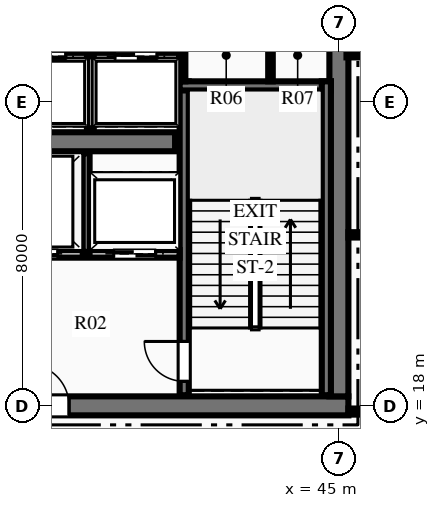
"""IFC4 building model, lengths in metres.
Left out: names, types, materials, properties, quantities, classifications, styles, units other than length and angle.
Written with IfcOpenShell. Run it as: python <this file> out.ifc"""

import sys

from ifc_helpers import new_model, si_unit, direction, frame, frame_2d, origin, place, context, subcontext, project, spatial, rectangle, extrude, element, fill, save


model = new_model("IFC4")
c1 = context("Model", 3, precision=1e-05, world=origin(), true_north=direction((0.0, 1.0)))
c2 = subcontext(c1, "Body", "Model", "MODEL_VIEW")
j1 = project(units=[si_unit("LENGTHUNIT", "METRE"), si_unit("PLANEANGLEUNIT", "RADIAN")], contexts=[c1])
p1 = place(None, origin())
s1 = spatial("IfcSite", under=j1, at=p1, CompositionType="ELEMENT")
p2 = place(p1, origin())
s2 = spatial("IfcBuilding", under=s1, at=p2, CompositionType="ELEMENT")
p3 = place(p2, frame((0.0, 0.0, 136.2)))
s3 = spatial("IfcBuildingStorey", under=s2, at=p3, CompositionType="ELEMENT", Elevation=136.2)
p4 = place(p3, frame((26.75, 18.0, 0.0), z_axis=(0.0, 0.0, 1.0), x_axis=(1.0, 0.0, 0.0)))
e1 = element("IfcWall", 1, at=p4, inside=s3, PredefinedType="SHEAR", context=c2, shape_type="SweptSolid", body=[
    extrude(rectangle(XDim=18.5, YDim=0.5, at=frame_2d((9.25, 0.0))), origin(), (0.0, 0.0, 1.0), 4.5),
])
p5 = place(p4, frame((7.35, 0.0, 0.0)))
e2 = element("IfcOpeningElement", 2, at=p5, cuts=e1, PredefinedType="OPENING", context=c2, shape_type="SweptSolid", body=[
    extrude(rectangle(XDim=1.1, YDim=2.15, at=frame_2d((0.55, 1.075))), frame((0.0, 0.26, 0.0), z_axis=(0.0, -1.0, 0.0), x_axis=(1.0, 0.0, 0.0)), (0.0, 0.0, 1.0), 0.52),
])
p6 = place(p4, frame((10.05, 0.0, 0.0)))
e3 = element("IfcOpeningElement", 3, at=p6, cuts=e1, PredefinedType="OPENING", context=c2, shape_type="SweptSolid", body=[
    extrude(rectangle(XDim=1.1, YDim=2.15, at=frame_2d((0.55, 1.075))), frame((0.0, 0.26, 0.0), z_axis=(0.0, -1.0, 0.0), x_axis=(1.0, 0.0, 0.0)), (0.0, 0.0, 1.0), 0.52),
])
p7 = place(p3, frame((45.0, 18.25, 0.0), z_axis=(0.0, 0.0, 1.0), x_axis=(0.0, 1.0, 0.0)))
e4 = element("IfcWall", 4, at=p7, inside=s3, PredefinedType="SHEAR", context=c2, shape_type="SweptSolid", body=[
    extrude(rectangle(XDim=15.5, YDim=0.5, at=frame_2d((7.75, 0.0))), origin(), (0.0, 0.0, 1.0), 4.5),
])
p8 = place(p7, frame((9.99, 0.0, 0.0)))
e5 = element("IfcOpeningElement", 5, at=p8, cuts=e4, PredefinedType="OPENING", context=c2, shape_type="SweptSolid", body=[
    extrude(rectangle(XDim=1.4, YDim=2.2, at=frame_2d((0.7, 1.1))), frame((0.0, 0.26, 0.0), z_axis=(0.0, -1.0, 0.0), x_axis=(1.0, 0.0, 0.0)), (0.0, 0.0, 1.0), 0.52),
])
p9 = place(p3, frame((31.31, 24.95, 0.0), z_axis=(0.0, 0.0, 1.0), x_axis=(1.0, 0.0, 0.0)))
e6 = element("IfcWall", 6, at=p9, inside=s3, PredefinedType="SHEAR", context=c2, shape_type="SweptSolid", body=[
    extrude(rectangle(XDim=9.38, YDim=0.5, at=frame_2d((4.69, 0.0))), origin(), (0.0, 0.0, 1.0), 4.5),
])
p10 = place(p3, frame((40.93, 18.28, 0.0), z_axis=(0.0, 0.0, 1.0), x_axis=(0.0, 1.0, 0.0)))
e7 = element("IfcWall", 7, at=p10, inside=s3, PredefinedType="SHEAR", context=c2, shape_type="SweptSolid", body=[
    extrude(rectangle(XDim=8.26, YDim=0.24, at=frame_2d((4.13, 0.0))), origin(), (0.0, 0.0, 1.0), 4.5),
])
p11 = place(p10, frame((0.365, 0.0, 0.0)))
e8 = element("IfcOpeningElement", 8, at=p11, cuts=e7, PredefinedType="OPENING", context=c2, shape_type="SweptSolid", body=[
    extrude(rectangle(XDim=1.05, YDim=2.15, at=frame_2d((0.525, 1.075))), frame((0.0, 0.13, 0.0), z_axis=(0.0, -1.0, 0.0), x_axis=(1.0, 0.0, 0.0)), (0.0, 0.0, 1.0), 0.26),
])
p12 = place(p3, frame((40.81, 26.42, 0.0), z_axis=(0.0, 0.0, 1.0), x_axis=(1.0, 0.0, 0.0)))
e9 = element("IfcWall", 9, at=p12, inside=s3, PredefinedType="SHEAR", context=c2, shape_type="SweptSolid", body=[
    extrude(rectangle(XDim=3.98, YDim=0.24, at=frame_2d((1.99, 0.0))), origin(), (0.0, 0.0, 1.0), 4.5),
])
p13 = place(p3, frame((44.67, 18.28, 0.0), z_axis=(0.0, 0.0, 1.0), x_axis=(0.0, 1.0, 0.0)))
e10 = element("IfcWall", 10, at=p13, inside=s3, PredefinedType="SHEAR", context=c2, shape_type="SweptSolid", body=[
    extrude(rectangle(XDim=8.26, YDim=0.24, at=frame_2d((4.13, 0.0))), origin(), (0.0, 0.0, 1.0), 4.5),
])
p14 = place(p3, frame((36.12, 22.0, 0.0), z_axis=(0.0, 0.0, 1.0), x_axis=(1.0, 0.0, 0.0)))
e11 = element("IfcWall", 11, at=p14, inside=s3, PredefinedType="PARTITIONING", context=c2, shape_type="SweptSolid", body=[
    extrude(rectangle(XDim=4.69, YDim=0.2, at=frame_2d((2.345, 0.0))), origin(), (0.0, 0.0, 1.0), 4.21),
])
p15 = place(p14, frame((2.955, 0.0, 0.0)))
e12 = element("IfcOpeningElement", 12, at=p15, cuts=e11, PredefinedType="OPENING", context=c2, shape_type="SweptSolid", body=[
    extrude(rectangle(XDim=1.1, YDim=2.15, at=frame_2d((0.55, 1.075))), frame((0.0, 0.11, 0.0), z_axis=(0.0, -1.0, 0.0), x_axis=(1.0, 0.0, 0.0)), (0.0, 0.0, 1.0), 0.22),
])
p16 = place(p14, frame((0.08, 0.0, 0.0)))
e13 = element("IfcOpeningElement", 13, at=p16, cuts=e11, PredefinedType="OPENING", context=c2, shape_type="SweptSolid", body=[
    extrude(rectangle(XDim=1.4, YDim=2.2, at=frame_2d((0.7, 1.1))), frame((0.0, 0.11, 0.0), z_axis=(0.0, -1.0, 0.0), x_axis=(1.0, 0.0, 0.0)), (0.0, 0.0, 1.0), 0.22),
])
p17 = place(p3, frame((38.35, 22.05, 0.0), z_axis=(0.0, 0.0, 1.0), x_axis=(0.0, 1.0, 0.0)))
e14 = element("IfcWall", 14, at=p17, inside=s3, PredefinedType="PARTITIONING", context=c2, shape_type="SweptSolid", body=[
    extrude(rectangle(XDim=2.6, YDim=0.18, at=frame_2d((1.3, 0.0))), origin(), (0.0, 0.0, 1.0), 4.21),
])
p18 = place(p3, frame((40.88, 26.54, 0.0), z_axis=(0.0, 0.0, 1.0), x_axis=(0.0, 1.0, 0.0)))
e15 = element("IfcWall", 15, at=p18, inside=s3, PredefinedType="PARTITIONING", context=c2, shape_type="SweptSolid", body=[
    extrude(rectangle(XDim=1.51, YDim=0.16, at=frame_2d((0.755, 0.0))), origin(), (0.0, 0.0, 1.0), 4.21),
])
p19 = place(p3, frame((43.2, 26.54, 0.0), z_axis=(0.0, 0.0, 1.0), x_axis=(0.0, 1.0, 0.0)))
e16 = element("IfcWall", 16, at=p19, inside=s3, PredefinedType="PARTITIONING", context=c2, shape_type="SweptSolid", body=[
    extrude(rectangle(XDim=1.44, YDim=0.12, at=frame_2d((0.72, 0.0))), origin(), (0.0, 0.0, 1.0), 4.21),
])
p20 = place(p3, frame((31.2, 27.2, 0.0), z_axis=(0.0, 0.0, 1.0), x_axis=(1.0, 0.0, 0.0)))
e17 = element("IfcWall", 17, at=p20, inside=s3, PredefinedType="PARTITIONING", context=c2, shape_type="SweptSolid", body=[
    extrude(rectangle(XDim=9.6, YDim=0.18, at=frame_2d((4.8, 0.0))), origin(), (0.0, 0.0, 1.0), 4.21),
])
p21 = place(p20, frame((0.59, 0.0, 0.0)))
e18 = element("IfcOpeningElement", 18, at=p21, cuts=e17, PredefinedType="OPENING", context=c2, shape_type="SweptSolid", body=[
    extrude(rectangle(XDim=1.1, YDim=2.15, at=frame_2d((0.55, 1.075))), frame((0.0, 0.1, 0.0), z_axis=(0.0, -1.0, 0.0), x_axis=(1.0, 0.0, 0.0)), (0.0, 0.0, 1.0), 0.2),
])
p22 = place(p20, frame((2.99, 0.0, 0.0)))
e19 = element("IfcOpeningElement", 19, at=p22, cuts=e17, PredefinedType="OPENING", context=c2, shape_type="SweptSolid", body=[
    extrude(rectangle(XDim=1.1, YDim=2.15, at=frame_2d((0.55, 1.075))), frame((0.0, 0.1, 0.0), z_axis=(0.0, -1.0, 0.0), x_axis=(1.0, 0.0, 0.0)), (0.0, 0.0, 1.0), 0.2),
])
p23 = place(p20, frame((5.51, 0.0, 0.0)))
e20 = element("IfcOpeningElement", 20, at=p23, cuts=e17, PredefinedType="OPENING", context=c2, shape_type="SweptSolid", body=[
    extrude(rectangle(XDim=1.1, YDim=2.15, at=frame_2d((0.55, 1.075))), frame((0.0, 0.1, 0.0), z_axis=(0.0, -1.0, 0.0), x_axis=(1.0, 0.0, 0.0)), (0.0, 0.0, 1.0), 0.2),
])
p24 = place(p20, frame((7.91, 0.0, 0.0)))
e21 = element("IfcOpeningElement", 21, at=p24, cuts=e17, PredefinedType="OPENING", context=c2, shape_type="SweptSolid", body=[
    extrude(rectangle(XDim=1.1, YDim=2.15, at=frame_2d((0.55, 1.075))), frame((0.0, 0.1, 0.0), z_axis=(0.0, -1.0, 0.0), x_axis=(1.0, 0.0, 0.0)), (0.0, 0.0, 1.0), 0.2),
])
p25 = place(p3, frame((38.46, 25.3, 0.0), z_axis=(0.0, 0.0, 1.0), x_axis=(0.0, 1.0, 0.0)))
e22 = element("IfcWall", 22, at=p25, inside=s3, PredefinedType="PARTITIONING", context=c2, shape_type="SweptSolid", body=[
    extrude(rectangle(XDim=1.9, YDim=0.18, at=frame_2d((0.95, 0.0))), origin(), (0.0, 0.0, 1.0), 4.21),
])
p26 = place(p3, frame((45.25, 17.85, 0.0), z_axis=(0.0, 0.0, 1.0), x_axis=(1.0, 0.0, 0.0)))
e23 = element("IfcWall", 23, at=p26, inside=s3, PredefinedType="PARTITIONING", context=c2, shape_type="SweptSolid", body=[
    extrude(rectangle(XDim=8.55, YDim=0.16, at=frame_2d((4.275, 0.0))), origin(), (0.0, 0.0, 1.0), 3.748),
])
p27 = place(p26, frame((2.211, 0.0, 0.0)))
e24 = element("IfcOpeningElement", 24, at=p27, cuts=e23, PredefinedType="OPENING", context=c2, shape_type="SweptSolid", body=[
    extrude(rectangle(XDim=1.05, YDim=2.15, at=frame_2d((0.525, 1.075))), frame((0.0, 0.09, 0.0), z_axis=(0.0, -1.0, 0.0), x_axis=(1.0, 0.0, 0.0)), (0.0, 0.0, 1.0), 0.18),
])
p28 = place(p3, frame((45.2, 27.25, 0.0), z_axis=(0.0, 0.0, 1.0), x_axis=(1.0, 0.0, 0.0)))
e25 = element("IfcWall", 25, at=p28, inside=s3, PredefinedType="PARTITIONING", context=c2, shape_type="SweptSolid", body=[
    extrude(rectangle(XDim=2.25, YDim=0.16, at=frame_2d((1.125, 0.0))), origin(), (0.0, 0.0, 1.0), 4.21),
])
p29 = place(p3, frame((45.25, 22.5, 0.0), z_axis=(0.0, 0.0, 1.0), x_axis=(1.0, 0.0, 0.0)))
e26 = element("IfcWall", 26, at=p29, inside=s3, PredefinedType="PARTITIONING", context=c2, shape_type="SweptSolid", body=[
    extrude(rectangle(XDim=22.649, YDim=0.14, at=frame_2d((11.325, 0.0))), origin(), (0.0, 0.0, 1.0), 4.21),
])
p30 = place(p11, origin())
e27 = element("IfcDoor", 27, at=p30, inside=s3, OperationType="SINGLE_SWING_RIGHT", PredefinedType="DOOR", context=c2, shape_type="SweptSolid", body=[
    extrude(rectangle(XDim=1.05, YDim=2.15, at=frame_2d((0.525, 1.075))), frame((0.0, 0.025, 0.0), z_axis=(0.0, -1.0, 0.0), x_axis=(1.0, 0.0, 0.0)), (0.0, 0.0, 1.0), 0.05),
])
fill(e8, e27)
p31 = place(p6, origin())
e28 = element("IfcDoor", 28, at=p31, inside=s3, OperationType="SINGLE_SWING_LEFT", PredefinedType="DOOR", context=c2, shape_type="SweptSolid", body=[
    extrude(rectangle(XDim=1.1, YDim=2.15, at=frame_2d((0.55, 1.075))), frame((0.0, 0.025, 0.0), z_axis=(0.0, -1.0, 0.0), x_axis=(1.0, 0.0, 0.0)), (0.0, 0.0, 1.0), 0.05),
])
fill(e3, e28)
p32 = place(p23, origin())
e29 = element("IfcDoor", 29, at=p32, inside=s3, OperationType="SLIDING_TO_LEFT", PredefinedType="DOOR", context=c2, shape_type="SweptSolid", body=[
    extrude(rectangle(XDim=1.1, YDim=2.15, at=frame_2d((0.55, 1.075))), frame((0.0, 0.025, 0.0), z_axis=(0.0, -1.0, 0.0), x_axis=(1.0, 0.0, 0.0)), (0.0, 0.0, 1.0), 0.05),
])
fill(e20, e29)
p33 = place(p24, origin())
e30 = element("IfcDoor", 30, at=p33, inside=s3, OperationType="SLIDING_TO_LEFT", PredefinedType="DOOR", context=c2, shape_type="SweptSolid", body=[
    extrude(rectangle(XDim=1.1, YDim=2.15, at=frame_2d((0.55, 1.075))), frame((0.0, 0.025, 0.0), z_axis=(0.0, -1.0, 0.0), x_axis=(1.0, 0.0, 0.0)), (0.0, 0.0, 1.0), 0.05),
])
fill(e21, e30)
p34 = place(p15, origin())
e31 = element("IfcDoor", 31, at=p34, inside=s3, OperationType="SLIDING_TO_LEFT", PredefinedType="DOOR", context=c2, shape_type="SweptSolid", body=[
    extrude(rectangle(XDim=1.1, YDim=2.15, at=frame_2d((0.55, 1.075))), frame((0.0, 0.025, 0.0), z_axis=(0.0, -1.0, 0.0), x_axis=(1.0, 0.0, 0.0)), (0.0, 0.0, 1.0), 0.05),
])
fill(e12, e31)
p35 = place(p16, origin())
e32 = element("IfcDoor", 32, at=p35, inside=s3, OperationType="SLIDING_TO_LEFT", PredefinedType="DOOR", context=c2, shape_type="SweptSolid", body=[
    extrude(rectangle(XDim=1.4, YDim=2.2, at=frame_2d((0.7, 1.1))), frame((0.0, 0.025, 0.0), z_axis=(0.0, -1.0, 0.0), x_axis=(1.0, 0.0, 0.0)), (0.0, 0.0, 1.0), 0.05),
])
fill(e13, e32)
save(model, sys.argv[1])
